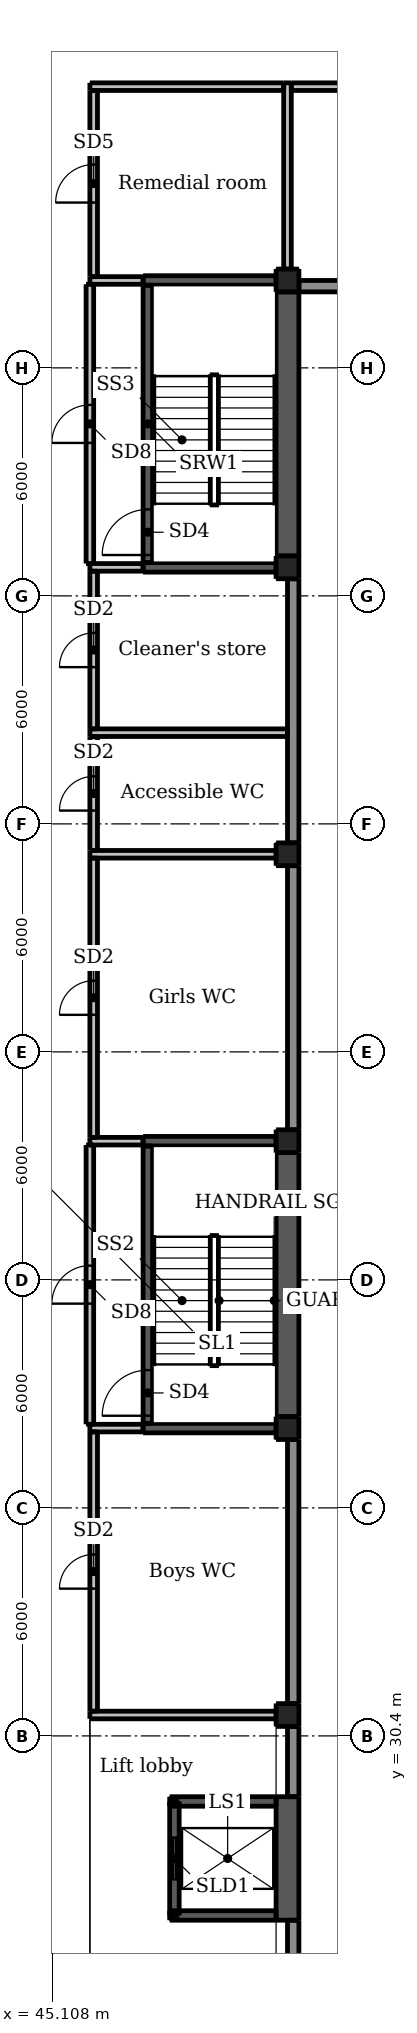
"""IFC4 building model, lengths in metres.
Left out: names, types, materials, properties, quantities, classifications, styles, units other than length and angle.
Written with IfcOpenShell. Run it as: python <this file> out.ifc"""

import sys

from ifc_helpers import new_model, si_unit, direction, frame, frame_2d, origin, origin_2d, place, context, subcontext, project, spatial, rectangle, extrude, element, fill, save


model = new_model("IFC4")
c1 = context("Model", 3, precision=1e-05, world=origin(), true_north=direction((0.0, 1.0)))
c2 = subcontext(c1, "Body", "Model", "MODEL_VIEW")
j1 = project(units=[si_unit("LENGTHUNIT", "METRE"), si_unit("PLANEANGLEUNIT", "RADIAN")], contexts=[c1])
p1 = place(None, origin())
s1 = spatial("IfcSite", under=j1, at=p1, CompositionType="ELEMENT")
p2 = place(p1, origin())
s2 = spatial("IfcBuilding", under=s1, at=p2, CompositionType="ELEMENT")
p3 = place(p2, frame((0.0, 0.0, 5.5)))
s3 = spatial("IfcBuildingStorey", under=s2, at=p3, CompositionType="ELEMENT", Elevation=5.5)
for number, where, z_axis, x_axis in (
    (1, (52.6, 30.4, 0.0), (0.0, 0.0, 1.0), (1.0, 0.0, 0.0)),
    (2, (52.6, 36.4, 0.0), (0.0, 0.0, 1.0), (1.0, 0.0, 0.0)),
    (3, (52.6, 42.4, 0.0), (0.0, 0.0, 1.0), (1.0, 0.0, 0.0)),
    (4, (52.6, 48.4, 0.0), (0.0, 0.0, 1.0), (1.0, 0.0, 0.0)),
    (5, (52.6, 54.4, 0.0), (0.0, 0.0, 1.0), (1.0, 0.0, 0.0)),
    (6, (52.6, 60.4, 0.0), (0.0, 0.0, 1.0), (1.0, 0.0, 0.0)),
):
    element("IfcColumn", number, at=place(p3, frame(where, z_axis=z_axis, x_axis=x_axis)), inside=s3, PredefinedType="COLUMN", context=c2, shape_type="SweptSolid", body=[
        extrude(rectangle(XDim=1.2, YDim=1.2, at=origin_2d()), origin(), (0.0, 0.0, 1.0), 4.2),
    ])
for number, where, z_axis, x_axis in (
    (7, (51.3, 30.95, -0.3), (0.0, 0.0, 1.0), (1.0, 0.0, 0.0)),
    (8, (51.3, 38.5, -0.3), (0.0, 0.0, 1.0), (1.0, 0.0, 0.0)),
    (9, (51.3, 46.05, -0.3), (0.0, 0.0, 1.0), (1.0, 0.0, 0.0)),
    (10, (51.3, 53.6, -0.3), (0.0, 0.0, 1.0), (1.0, 0.0, 0.0)),
    (11, (51.3, 61.15, -0.3), (0.0, 0.0, 1.0), (1.0, 0.0, 0.0)),
    (12, (51.3, 68.7, -0.3), (0.0, 0.0, 1.0), (1.0, 0.0, 0.0)),
):
    element("IfcColumn", number, at=place(p3, frame(where, z_axis=z_axis, x_axis=x_axis)), inside=s3, PredefinedType="COLUMN", context=c2, shape_type="SweptSolid", body=[
        extrude(rectangle(XDim=0.6, YDim=0.6, at=origin_2d()), origin(), (0.0, 0.0, 1.0), 4.5),
    ])
p4 = place(p3, frame((47.625, 38.625, -0.3), z_axis=(0.0, 0.0, 1.0), x_axis=(0.0, 1.0, 0.0)))
e13 = element("IfcWall", 13, at=p4, inside=s3, PredefinedType="SHEAR", context=c2, shape_type="SweptSolid", body=[
    extrude(rectangle(XDim=7.3, YDim=0.25, at=frame_2d((3.65, 0.0))), origin(), (0.0, 0.0, 1.0), 4.5),
])
p5 = place(p4, frame((0.2, 0.0, 0.3)))
e14 = element("IfcOpeningElement", 14, at=p5, cuts=e13, PredefinedType="OPENING", context=c2, shape_type="SweptSolid", body=[
    extrude(rectangle(XDim=1.2, YDim=2.1, at=frame_2d((0.6, 1.05))), frame((0.0, 0.135, 0.0), z_axis=(0.0, -1.0, 0.0), x_axis=(1.0, 0.0, 0.0)), (0.0, 0.0, 1.0), 0.27),
])
for number, where, z_axis, x_axis in (
    (15, (47.5, 38.5, -0.3), (0.0, 0.0, 1.0), (1.0, 0.0, 0.0)),
    (16, (47.5, 46.05, -0.3), (0.0, 0.0, 1.0), (1.0, 0.0, 0.0)),
):
    element("IfcWall", number, at=place(p3, frame(where, z_axis=z_axis, x_axis=x_axis)), inside=s3, PredefinedType="SHEAR", context=c2, shape_type="SweptSolid", body=[
        extrude(rectangle(XDim=3.5, YDim=0.25, at=frame_2d((1.75, 0.0))), origin(), (0.0, 0.0, 1.0), 4.5),
    ])
p6 = place(p3, frame((51.3, 38.8, -0.3), z_axis=(0.0, 0.0, 1.0), x_axis=(0.0, 1.0, 0.0)))
e17 = element("IfcWall", 17, at=p6, inside=s3, PredefinedType="SHEAR", context=c2, shape_type="SweptSolid", body=[
    extrude(rectangle(XDim=6.95, YDim=0.6, at=frame_2d((3.475, 0.0))), origin(), (0.0, 0.0, 1.0), 4.5),
])
p7 = place(p3, frame((47.625, 61.275, -0.3), z_axis=(0.0, 0.0, 1.0), x_axis=(0.0, 1.0, 0.0)))
e18 = element("IfcWall", 18, at=p7, inside=s3, PredefinedType="SHEAR", context=c2, shape_type="SweptSolid", body=[
    extrude(rectangle(XDim=7.3, YDim=0.25, at=frame_2d((3.65, 0.0))), origin(), (0.0, 0.0, 1.0), 4.5),
])
p8 = place(p7, frame((0.2, 0.0, 0.3)))
e19 = element("IfcOpeningElement", 19, at=p8, cuts=e18, PredefinedType="OPENING", context=c2, shape_type="SweptSolid", body=[
    extrude(rectangle(XDim=1.2, YDim=2.1, at=frame_2d((0.6, 1.05))), frame((0.0, 0.135, 0.0), z_axis=(0.0, -1.0, 0.0), x_axis=(1.0, 0.0, 0.0)), (0.0, 0.0, 1.0), 0.27),
])
for number, where, z_axis, x_axis in (
    (20, (47.5, 61.15, -0.3), (0.0, 0.0, 1.0), (1.0, 0.0, 0.0)),
    (21, (47.5, 68.7, -0.3), (0.0, 0.0, 1.0), (1.0, 0.0, 0.0)),
):
    element("IfcWall", number, at=place(p3, frame(where, z_axis=z_axis, x_axis=x_axis)), inside=s3, PredefinedType="SHEAR", context=c2, shape_type="SweptSolid", body=[
        extrude(rectangle(XDim=3.5, YDim=0.25, at=frame_2d((1.75, 0.0))), origin(), (0.0, 0.0, 1.0), 4.5),
    ])
p9 = place(p3, frame((51.3, 61.45, -0.3), z_axis=(0.0, 0.0, 1.0), x_axis=(0.0, 1.0, 0.0)))
e22 = element("IfcWall", 22, at=p9, inside=s3, PredefinedType="SHEAR", context=c2, shape_type="SweptSolid", body=[
    extrude(rectangle(XDim=6.95, YDim=0.6, at=frame_2d((3.475, 0.0))), origin(), (0.0, 0.0, 1.0), 4.5),
])
p10 = place(p3, frame((48.325, 25.675, -0.3), z_axis=(0.0, 0.0, 1.0), x_axis=(0.0, 1.0, 0.0)))
e23 = element("IfcWall", 23, at=p10, inside=s3, PredefinedType="SHEAR", context=c2, shape_type="SweptSolid", body=[
    extrude(rectangle(XDim=3.0, YDim=0.25, at=frame_2d((1.5, 0.0))), origin(), (0.0, 0.0, 1.0), 4.5),
])
p11 = place(p10, frame((0.95, 0.0, 0.3)))
e24 = element("IfcOpeningElement", 24, at=p11, cuts=e23, PredefinedType="OPENING", context=c2, shape_type="SweptSolid", body=[
    extrude(rectangle(XDim=1.1, YDim=2.1, at=frame_2d((0.55, 1.05))), frame((0.0, 0.135, 0.0), z_axis=(0.0, -1.0, 0.0), x_axis=(1.0, 0.0, 0.0)), (0.0, 0.0, 1.0), 0.27),
])
for number, where, z_axis, x_axis in (
    (25, (48.2, 25.675, -0.3), (0.0, 0.0, 1.0), (1.0, 0.0, 0.0)),
    (26, (48.2, 28.675, -0.3), (0.0, 0.0, 1.0), (1.0, 0.0, 0.0)),
):
    element("IfcWall", number, at=place(p3, frame(where, z_axis=z_axis, x_axis=x_axis)), inside=s3, PredefinedType="SHEAR", context=c2, shape_type="SweptSolid", body=[
        extrude(rectangle(XDim=2.8, YDim=0.25, at=frame_2d((1.4, 0.0))), origin(), (0.0, 0.0, 1.0), 4.5),
    ])
p12 = place(p3, frame((51.3, 25.55, -0.3), z_axis=(0.0, 0.0, 1.0), x_axis=(0.0, 1.0, 0.0)))
e27 = element("IfcWall", 27, at=p12, inside=s3, PredefinedType="SHEAR", context=c2, shape_type="SweptSolid", body=[
    extrude(rectangle(XDim=3.25, YDim=0.6, at=frame_2d((1.625, 0.0))), origin(), (0.0, 0.0, 1.0), 4.5),
])
p13 = place(p3, frame((52.0, 67.875, 0.0), z_axis=(0.0, 0.0, 1.0), x_axis=(1.0, 0.0, 0.0)))
e28 = element("IfcWall", 28, at=p13, inside=s3, PredefinedType="SOLIDWALL", context=c2, shape_type="SweptSolid", body=[
    extrude(rectangle(XDim=7.0, YDim=0.25, at=frame_2d((3.5, 0.0))), origin(), (0.0, 0.0, 1.0), 4.2),
])
p14 = place(p3, frame((52.125, 20.0, 0.0), z_axis=(0.0, 0.0, 1.0), x_axis=(0.0, 1.0, 0.0)))
e29 = element("IfcWall", 29, at=p14, inside=s3, PredefinedType="SOLIDWALL", context=c2, shape_type="SweptSolid", body=[
    extrude(rectangle(XDim=9.8, YDim=0.25, at=frame_2d((4.9, 0.0))), origin(), (0.0, 0.0, 1.0), 4.2),
])
for number, where, z_axis, x_axis in (
    (30, (52.125, 31.0, 0.0), (0.0, 0.0, 1.0), (0.0, 1.0, 0.0)),
    (31, (52.125, 37.0, 0.0), (0.0, 0.0, 1.0), (0.0, 1.0, 0.0)),
    (32, (52.125, 43.0, 0.0), (0.0, 0.0, 1.0), (0.0, 1.0, 0.0)),
    (33, (52.125, 49.0, 0.0), (0.0, 0.0, 1.0), (0.0, 1.0, 0.0)),
    (34, (52.125, 55.0, 0.0), (0.0, 0.0, 1.0), (0.0, 1.0, 0.0)),
):
    element("IfcWall", number, at=place(p3, frame(where, z_axis=z_axis, x_axis=x_axis)), inside=s3, PredefinedType="SOLIDWALL", context=c2, shape_type="SweptSolid", body=[
        extrude(rectangle(XDim=4.8, YDim=0.25, at=frame_2d((2.4, 0.0))), origin(), (0.0, 0.0, 1.0), 4.2),
    ])
p15 = place(p3, frame((52.125, 61.0, 0.0), z_axis=(0.0, 0.0, 1.0), x_axis=(0.0, 1.0, 0.0)))
e35 = element("IfcWall", 35, at=p15, inside=s3, PredefinedType="SOLIDWALL", context=c2, shape_type="SweptSolid", body=[
    extrude(rectangle(XDim=7.0, YDim=0.25, at=frame_2d((3.5, 0.0))), origin(), (0.0, 0.0, 1.0), 4.2),
])
for number, where, z_axis, x_axis in (
    (36, (51.45, 31.25, 0.0), (0.0, 0.0, 1.0), (0.0, 1.0, 0.0)),
    (37, (51.45, 46.35, 0.0), (0.0, 0.0, 1.0), (0.0, 1.0, 0.0)),
):
    element("IfcWall", number, at=place(p3, frame(where, z_axis=z_axis, x_axis=x_axis)), inside=s3, PredefinedType="SOLIDWALL", context=c2, shape_type="SweptSolid", body=[
        extrude(rectangle(XDim=6.95, YDim=0.3, at=frame_2d((3.475, 0.0))), origin(), (0.0, 0.0, 1.0), 3.3),
    ])
p16 = place(p3, frame((51.45, 53.9, 0.0), z_axis=(0.0, 0.0, 1.0), x_axis=(0.0, 1.0, 0.0)))
e38 = element("IfcWall", 38, at=p16, inside=s3, PredefinedType="SOLIDWALL", context=c2, shape_type="SweptSolid", body=[
    extrude(rectangle(XDim=6.95, YDim=0.3, at=frame_2d((3.475, 0.0))), origin(), (0.0, 0.0, 1.0), 3.3),
])
p17 = place(p3, frame((51.6, 68.55, 0.0), z_axis=(0.0, 0.0, 1.0), x_axis=(1.0, 0.0, 0.0)))
e39 = element("IfcWall", 39, at=p17, inside=s3, PredefinedType="SOLIDWALL", context=c2, shape_type="SweptSolid", body=[
    extrude(rectangle(XDim=7.467, YDim=0.3, at=frame_2d((3.733, 0.0))), origin(), (0.0, 0.0, 1.0), 3.3),
])
p18 = place(p3, frame((51.45, 23.7, 0.0), z_axis=(0.0, 0.0, 1.0), x_axis=(0.0, 1.0, 0.0)))
e40 = element("IfcWall", 40, at=p18, inside=s3, PredefinedType="SOLIDWALL", context=c2, shape_type="SweptSolid", body=[
    extrude(rectangle(XDim=1.85, YDim=0.3, at=frame_2d((0.925, 0.0))), origin(), (0.0, 0.0, 1.0), 3.3),
])
p19 = place(p3, frame((51.45, 28.8, 0.0), z_axis=(0.0, 0.0, 1.0), x_axis=(0.0, 1.0, 0.0)))
e41 = element("IfcWall", 41, at=p19, inside=s3, PredefinedType="SOLIDWALL", context=c2, shape_type="SweptSolid", body=[
    extrude(rectangle(XDim=1.85, YDim=0.3, at=frame_2d((0.925, 0.0))), origin(), (0.0, 0.0, 1.0), 3.3),
])
p20 = place(p3, frame((46.2, 31.05, 0.0), z_axis=(0.0, 0.0, 1.0), x_axis=(0.0, 1.0, 0.0)))
e42 = element("IfcWall", 42, at=p20, inside=s3, PredefinedType="PARTITIONING", context=c2, shape_type="SweptSolid", body=[
    extrude(rectangle(XDim=7.35, YDim=0.2, at=frame_2d((3.675, 0.0))), origin(), (0.0, 0.0, 1.0), 3.1),
])
p21 = place(p20, frame((3.225, 0.0, 0.0)))
e43 = element("IfcOpeningElement", 43, at=p21, cuts=e42, PredefinedType="OPENING", context=c2, shape_type="SweptSolid", body=[
    extrude(rectangle(XDim=0.9, YDim=2.1, at=frame_2d((0.45, 1.05))), frame((0.0, 0.11, 0.0), z_axis=(0.0, -1.0, 0.0), x_axis=(1.0, 0.0, 0.0)), (0.0, 0.0, 1.0), 0.22),
])
p22 = place(p3, frame((46.2, 46.15, 0.0), z_axis=(0.0, 0.0, 1.0), x_axis=(0.0, 1.0, 0.0)))
e44 = element("IfcWall", 44, at=p22, inside=s3, PredefinedType="PARTITIONING", context=c2, shape_type="SweptSolid", body=[
    extrude(rectangle(XDim=7.35, YDim=0.2, at=frame_2d((3.675, 0.0))), origin(), (0.0, 0.0, 1.0), 3.1),
])
p23 = place(p22, frame((3.225, 0.0, 0.0)))
e45 = element("IfcOpeningElement", 45, at=p23, cuts=e44, PredefinedType="OPENING", context=c2, shape_type="SweptSolid", body=[
    extrude(rectangle(XDim=0.9, YDim=2.1, at=frame_2d((0.45, 1.05))), frame((0.0, 0.11, 0.0), z_axis=(0.0, -1.0, 0.0), x_axis=(1.0, 0.0, 0.0)), (0.0, 0.0, 1.0), 0.22),
])
p24 = place(p3, frame((46.2, 53.7, 0.0), z_axis=(0.0, 0.0, 1.0), x_axis=(0.0, 1.0, 0.0)))
e46 = element("IfcWall", 46, at=p24, inside=s3, PredefinedType="PARTITIONING", context=c2, shape_type="SweptSolid", body=[
    extrude(rectangle(XDim=3.0, YDim=0.2, at=frame_2d((1.5, 0.0))), origin(), (0.0, 0.0, 1.0), 3.1),
])
p25 = place(p24, frame((1.05, 0.0, 0.0)))
e47 = element("IfcOpeningElement", 47, at=p25, cuts=e46, PredefinedType="OPENING", context=c2, shape_type="SweptSolid", body=[
    extrude(rectangle(XDim=0.9, YDim=2.1, at=frame_2d((0.45, 1.05))), frame((0.0, 0.11, 0.0), z_axis=(0.0, -1.0, 0.0), x_axis=(1.0, 0.0, 0.0)), (0.0, 0.0, 1.0), 0.22),
])
p26 = place(p3, frame((46.2, 56.9, 0.0), z_axis=(0.0, 0.0, 1.0), x_axis=(0.0, 1.0, 0.0)))
e48 = element("IfcWall", 48, at=p26, inside=s3, PredefinedType="PARTITIONING", context=c2, shape_type="SweptSolid", body=[
    extrude(rectangle(XDim=4.15, YDim=0.2, at=frame_2d((2.075, 0.0))), origin(), (0.0, 0.0, 1.0), 3.1),
])
p27 = place(p26, frame((1.625, 0.0, 0.0)))
e49 = element("IfcOpeningElement", 49, at=p27, cuts=e48, PredefinedType="OPENING", context=c2, shape_type="SweptSolid", body=[
    extrude(rectangle(XDim=0.9, YDim=2.1, at=frame_2d((0.45, 1.05))), frame((0.0, 0.11, 0.0), z_axis=(0.0, -1.0, 0.0), x_axis=(1.0, 0.0, 0.0)), (0.0, 0.0, 1.0), 0.22),
])
p28 = place(p3, frame((46.2, 68.8, 0.0), z_axis=(0.0, 0.0, 1.0), x_axis=(0.0, 1.0, 0.0)))
e50 = element("IfcWall", 50, at=p28, inside=s3, PredefinedType="PARTITIONING", context=c2, shape_type="SweptSolid", body=[
    extrude(rectangle(XDim=4.9, YDim=0.2, at=frame_2d((2.45, 0.0))), origin(), (0.0, 0.0, 1.0), 3.1),
])
p29 = place(p28, frame((1.95, 0.0, 0.0)))
e51 = element("IfcOpeningElement", 51, at=p29, cuts=e50, PredefinedType="OPENING", context=c2, shape_type="SweptSolid", body=[
    extrude(rectangle(XDim=1.0, YDim=2.1, at=frame_2d((0.5, 1.05))), frame((0.0, 0.11, 0.0), z_axis=(0.0, -1.0, 0.0), x_axis=(1.0, 0.0, 0.0)), (0.0, 0.0, 1.0), 0.22),
])
p30 = place(p3, frame((46.1, 30.95, 0.0), z_axis=(0.0, 0.0, 1.0), x_axis=(1.0, 0.0, 0.0)))
e52 = element("IfcWall", 52, at=p30, inside=s3, PredefinedType="PARTITIONING", context=c2, shape_type="SweptSolid", body=[
    extrude(rectangle(XDim=4.9, YDim=0.2, at=frame_2d((2.45, 0.0))), origin(), (0.0, 0.0, 1.0), 3.1),
])
for number, where, z_axis, x_axis in (
    (53, (46.1, 38.5, 0.0), (0.0, 0.0, 1.0), (1.0, 0.0, 0.0)),
    (54, (46.1, 46.05, 0.0), (0.0, 0.0, 1.0), (1.0, 0.0, 0.0)),
):
    element("IfcWall", number, at=place(p3, frame(where, z_axis=z_axis, x_axis=x_axis)), inside=s3, PredefinedType="PARTITIONING", context=c2, shape_type="SweptSolid", body=[
        extrude(rectangle(XDim=1.4, YDim=0.2, at=frame_2d((0.7, 0.0))), origin(), (0.0, 0.0, 1.0), 3.1),
    ])
p31 = place(p3, frame((46.1, 53.6, 0.0), z_axis=(0.0, 0.0, 1.0), x_axis=(1.0, 0.0, 0.0)))
e55 = element("IfcWall", 55, at=p31, inside=s3, PredefinedType="PARTITIONING", context=c2, shape_type="SweptSolid", body=[
    extrude(rectangle(XDim=4.9, YDim=0.2, at=frame_2d((2.45, 0.0))), origin(), (0.0, 0.0, 1.0), 3.1),
])
for number, where, z_axis, x_axis in (
    (56, (46.1, 61.15, 0.0), (0.0, 0.0, 1.0), (1.0, 0.0, 0.0)),
    (57, (46.1, 68.7, 0.0), (0.0, 0.0, 1.0), (1.0, 0.0, 0.0)),
):
    element("IfcWall", number, at=place(p3, frame(where, z_axis=z_axis, x_axis=x_axis)), inside=s3, PredefinedType="PARTITIONING", context=c2, shape_type="SweptSolid", body=[
        extrude(rectangle(XDim=1.4, YDim=0.2, at=frame_2d((0.7, 0.0))), origin(), (0.0, 0.0, 1.0), 3.1),
    ])
p32 = place(p3, frame((46.1, 56.8, 0.0), z_axis=(0.0, 0.0, 1.0), x_axis=(1.0, 0.0, 0.0)))
e58 = element("IfcWall", 58, at=p32, inside=s3, PredefinedType="PARTITIONING", context=c2, shape_type="SweptSolid", body=[
    extrude(rectangle(XDim=5.2, YDim=0.2, at=frame_2d((2.6, 0.0))), origin(), (0.0, 0.0, 1.0), 3.1),
])
p33 = place(p3, frame((51.4, 73.8, 0.0), z_axis=(0.0, 0.0, 1.0), x_axis=(1.0, 0.0, 0.0)))
e59 = element("IfcWall", 59, at=p33, inside=s3, PredefinedType="PARTITIONING", context=c2, shape_type="SweptSolid", body=[
    extrude(rectangle(XDim=7.867, YDim=0.2, at=frame_2d((3.934, 0.0))), origin(), (0.0, 0.0, 1.0), 3.1),
])
p34 = place(p33, frame((3.434, 0.0, 0.0)))
e60 = element("IfcOpeningElement", 60, at=p34, cuts=e59, PredefinedType="OPENING", context=c2, shape_type="SweptSolid", body=[
    extrude(rectangle(XDim=1.0, YDim=2.1, at=frame_2d((0.5, 1.05))), frame((0.0, 0.11, 0.0), z_axis=(0.0, -1.0, 0.0), x_axis=(1.0, 0.0, 0.0)), (0.0, 0.0, 1.0), 0.22),
])
p35 = place(p3, frame((46.1, 73.8, 0.0), z_axis=(0.0, 0.0, 1.0), x_axis=(1.0, 0.0, 0.0)))
e61 = element("IfcWall", 61, at=p35, inside=s3, PredefinedType="PARTITIONING", context=c2, shape_type="SweptSolid", body=[
    extrude(rectangle(XDim=5.1, YDim=0.2, at=frame_2d((2.55, 0.0))), origin(), (0.0, 0.0, 1.0), 3.1),
])
p36 = place(p3, frame((51.3, 69.0, 0.0), z_axis=(0.0, 0.0, 1.0), x_axis=(0.0, 1.0, 0.0)))
e62 = element("IfcWall", 62, at=p36, inside=s3, PredefinedType="PARTITIONING", context=c2, shape_type="SweptSolid", body=[
    extrude(rectangle(XDim=4.9, YDim=0.2, at=frame_2d((2.45, 0.0))), origin(), (0.0, 0.0, 1.0), 3.1),
])
p37 = place(p3, frame((46.1, 38.6, 0.0), z_axis=(0.0, 0.0, 1.0), x_axis=(0.0, 1.0, 0.0)))
e63 = element("IfcWall", 63, at=p37, inside=s3, PredefinedType="PARTITIONING", context=c2, shape_type="SweptSolid", body=[
    extrude(rectangle(XDim=7.35, YDim=0.2, at=frame_2d((3.675, 0.0))), origin(), (0.0, 0.0, 1.0), 3.1),
])
p38 = place(p37, frame((3.175, 0.0, 0.0)))
e64 = element("IfcOpeningElement", 64, at=p38, cuts=e63, PredefinedType="OPENING", context=c2, shape_type="SweptSolid", body=[
    extrude(rectangle(XDim=1.0, YDim=2.1, at=frame_2d((0.5, 1.05))), frame((0.0, 0.11, 0.0), z_axis=(0.0, -1.0, 0.0), x_axis=(1.0, 0.0, 0.0)), (0.0, 0.0, 1.0), 0.22),
])
p39 = place(p3, frame((46.1, 61.25, 0.0), z_axis=(0.0, 0.0, 1.0), x_axis=(0.0, 1.0, 0.0)))
e65 = element("IfcWall", 65, at=p39, inside=s3, PredefinedType="PARTITIONING", context=c2, shape_type="SweptSolid", body=[
    extrude(rectangle(XDim=7.35, YDim=0.2, at=frame_2d((3.675, 0.0))), origin(), (0.0, 0.0, 1.0), 3.1),
])
p40 = place(p39, frame((3.175, 0.0, 0.0)))
e66 = element("IfcOpeningElement", 66, at=p40, cuts=e65, PredefinedType="OPENING", context=c2, shape_type="SweptSolid", body=[
    extrude(rectangle(XDim=1.0, YDim=2.1, at=frame_2d((0.5, 1.05))), frame((0.0, 0.11, 0.0), z_axis=(0.0, -1.0, 0.0), x_axis=(1.0, 0.0, 0.0)), (0.0, 0.0, 1.0), 0.22),
])
p41 = place(p21, origin())
e67 = element("IfcDoor", 67, at=p41, inside=s3, OperationType="SINGLE_SWING_LEFT", PredefinedType="DOOR", context=c2, shape_type="SweptSolid", body=[
    extrude(rectangle(XDim=0.9, YDim=2.1, at=frame_2d((0.45, 1.05))), frame((0.0, 0.025, 0.0), z_axis=(0.0, -1.0, 0.0), x_axis=(1.0, 0.0, 0.0)), (0.0, 0.0, 1.0), 0.05),
])
fill(e43, e67)
p42 = place(p23, origin())
e68 = element("IfcDoor", 68, at=p42, inside=s3, OperationType="SINGLE_SWING_LEFT", PredefinedType="DOOR", context=c2, shape_type="SweptSolid", body=[
    extrude(rectangle(XDim=0.9, YDim=2.1, at=frame_2d((0.45, 1.05))), frame((0.0, 0.025, 0.0), z_axis=(0.0, -1.0, 0.0), x_axis=(1.0, 0.0, 0.0)), (0.0, 0.0, 1.0), 0.05),
])
fill(e45, e68)
p43 = place(p25, origin())
e69 = element("IfcDoor", 69, at=p43, inside=s3, OperationType="SINGLE_SWING_LEFT", PredefinedType="DOOR", context=c2, shape_type="SweptSolid", body=[
    extrude(rectangle(XDim=0.9, YDim=2.1, at=frame_2d((0.45, 1.05))), frame((0.0, 0.025, 0.0), z_axis=(0.0, -1.0, 0.0), x_axis=(1.0, 0.0, 0.0)), (0.0, 0.0, 1.0), 0.05),
])
fill(e47, e69)
p44 = place(p27, origin())
e70 = element("IfcDoor", 70, at=p44, inside=s3, OperationType="SINGLE_SWING_LEFT", PredefinedType="DOOR", context=c2, shape_type="SweptSolid", body=[
    extrude(rectangle(XDim=0.9, YDim=2.1, at=frame_2d((0.45, 1.05))), frame((0.0, 0.025, 0.0), z_axis=(0.0, -1.0, 0.0), x_axis=(1.0, 0.0, 0.0)), (0.0, 0.0, 1.0), 0.05),
])
fill(e49, e70)
p45 = place(p29, origin())
e71 = element("IfcDoor", 71, at=p45, inside=s3, OperationType="SINGLE_SWING_LEFT", PredefinedType="DOOR", context=c2, shape_type="SweptSolid", body=[
    extrude(rectangle(XDim=1.0, YDim=2.1, at=frame_2d((0.5, 1.05))), frame((0.0, 0.025, 0.0), z_axis=(0.0, -1.0, 0.0), x_axis=(1.0, 0.0, 0.0)), (0.0, 0.0, 1.0), 0.05),
])
fill(e51, e71)
p46 = place(p38, origin())
e72 = element("IfcDoor", 72, at=p46, inside=s3, OperationType="SINGLE_SWING_LEFT", PredefinedType="DOOR", context=c2, shape_type="SweptSolid", body=[
    extrude(rectangle(XDim=1.0, YDim=2.1, at=frame_2d((0.5, 1.05))), frame((0.0, 0.025, 0.0), z_axis=(0.0, -1.0, 0.0), x_axis=(1.0, 0.0, 0.0)), (0.0, 0.0, 1.0), 0.05),
])
fill(e64, e72)
p47 = place(p40, origin())
e73 = element("IfcDoor", 73, at=p47, inside=s3, OperationType="SINGLE_SWING_LEFT", PredefinedType="DOOR", context=c2, shape_type="SweptSolid", body=[
    extrude(rectangle(XDim=1.0, YDim=2.1, at=frame_2d((0.5, 1.05))), frame((0.0, 0.025, 0.0), z_axis=(0.0, -1.0, 0.0), x_axis=(1.0, 0.0, 0.0)), (0.0, 0.0, 1.0), 0.05),
])
fill(e66, e73)
p48 = place(p5, origin())
e74 = element("IfcDoor", 74, at=p48, inside=s3, OperationType="SINGLE_SWING_LEFT", PredefinedType="DOOR", context=c2, shape_type="SweptSolid", body=[
    extrude(rectangle(XDim=1.2, YDim=2.1, at=frame_2d((0.6, 1.05))), frame((0.0, 0.025, 0.0), z_axis=(0.0, -1.0, 0.0), x_axis=(1.0, 0.0, 0.0)), (0.0, 0.0, 1.0), 0.05),
])
fill(e14, e74)
p49 = place(p8, origin())
e75 = element("IfcDoor", 75, at=p49, inside=s3, OperationType="SINGLE_SWING_LEFT", PredefinedType="DOOR", context=c2, shape_type="SweptSolid", body=[
    extrude(rectangle(XDim=1.2, YDim=2.1, at=frame_2d((0.6, 1.05))), frame((0.0, 0.025, 0.0), z_axis=(0.0, -1.0, 0.0), x_axis=(1.0, 0.0, 0.0)), (0.0, 0.0, 1.0), 0.05),
])
fill(e19, e75)
p50 = place(p11, origin())
e76 = element("IfcDoor", 76, at=p50, inside=s3, OperationType="SLIDING_TO_LEFT", PredefinedType="DOOR", context=c2, shape_type="SweptSolid", body=[
    extrude(rectangle(XDim=1.1, YDim=2.1, at=frame_2d((0.55, 1.05))), frame((0.0, 0.025, 0.0), z_axis=(0.0, -1.0, 0.0), x_axis=(1.0, 0.0, 0.0)), (0.0, 0.0, 1.0), 0.05),
])
fill(e24, e76)
save(model, sys.argv[1])
